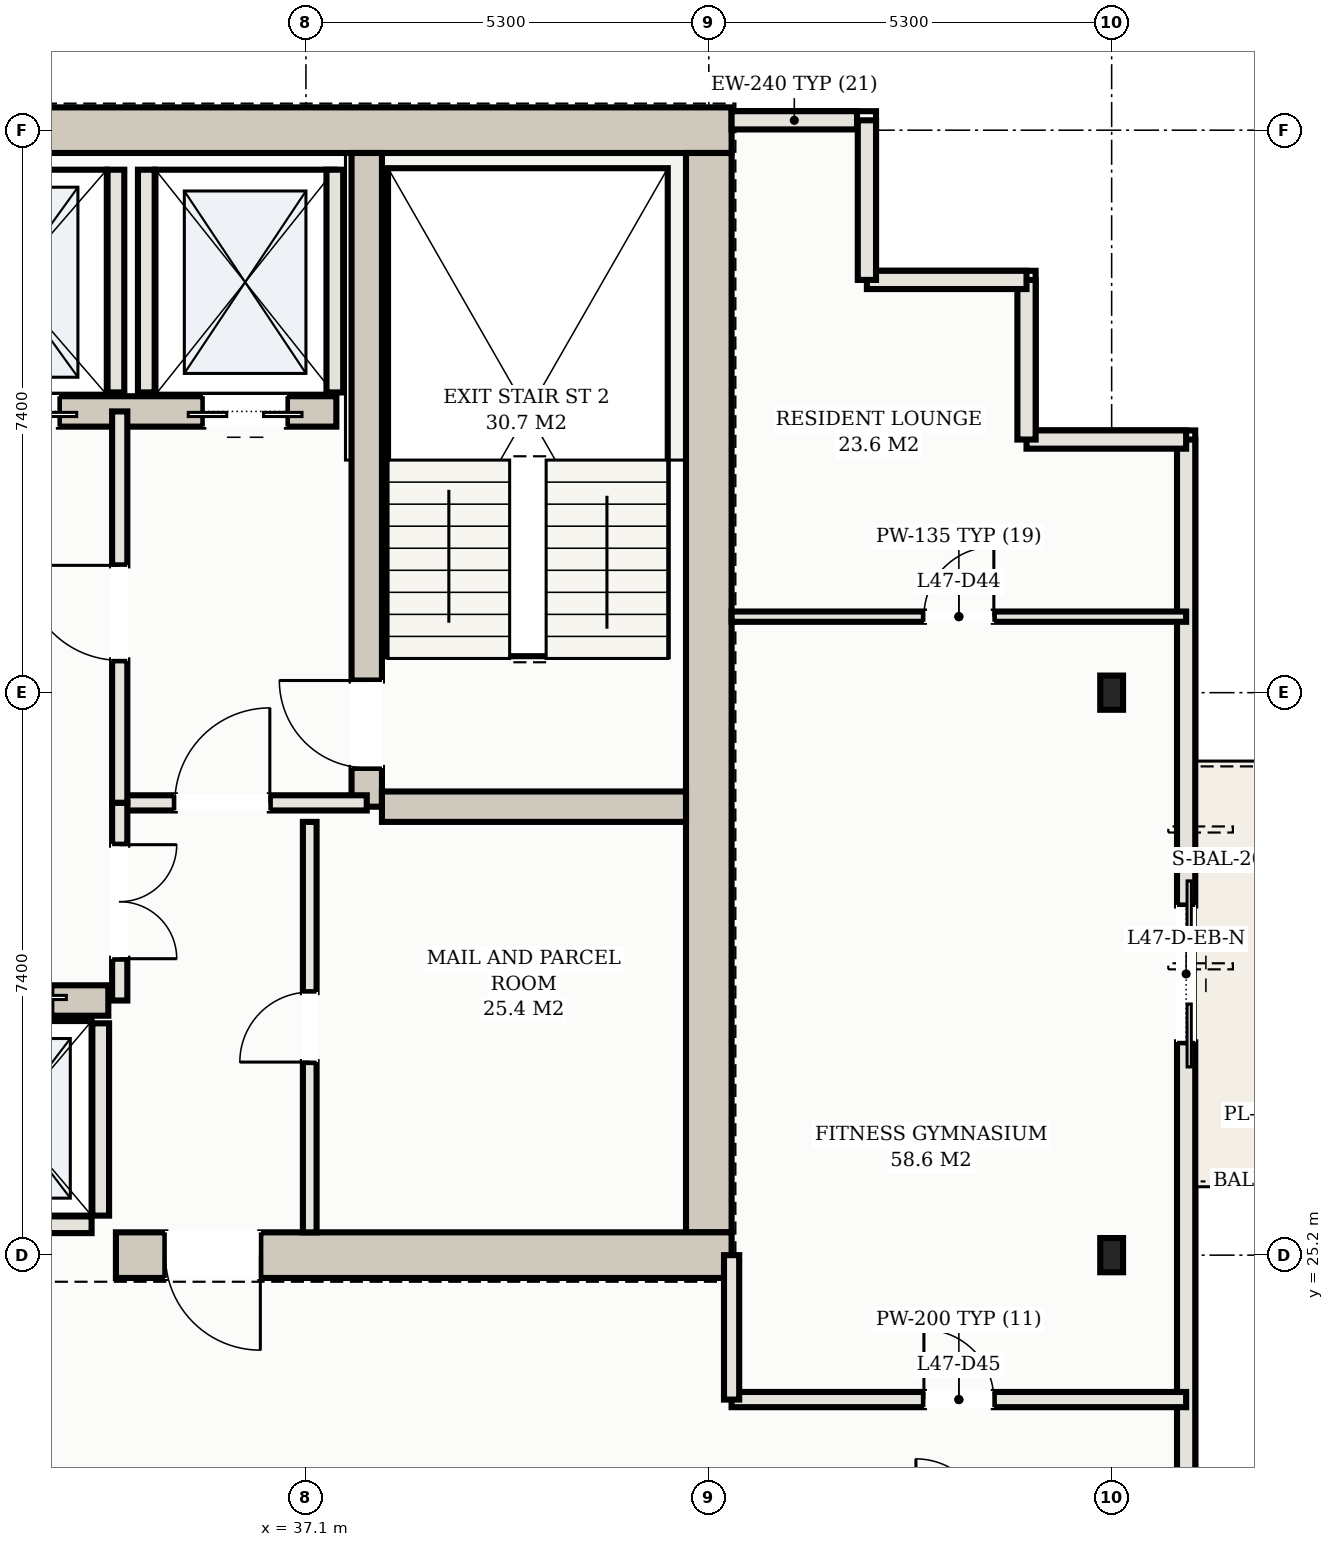
"""IFC4 building model, lengths in metres.
Left out: names, types, materials, properties, quantities, classifications, styles, units other than length and angle.
Written with IfcOpenShell. Run it as: python <this file> out.ifc"""

import sys

from ifc_helpers import new_model, si_unit, direction, frame, frame_2d, origin, origin_2d, place, context, subcontext, project, spatial, rectangle, hollow_rectangle, extrude, element, fill, save


model = new_model("IFC4")
c1 = context("Model", 3, precision=1e-05, world=origin(), true_north=direction((0.0, 1.0)))
c2 = subcontext(c1, "Body", "Model", "MODEL_VIEW")
j1 = project(units=[si_unit("LENGTHUNIT", "METRE"), si_unit("PLANEANGLEUNIT", "RADIAN")], contexts=[c1])
p1 = place(None, origin())
s1 = spatial("IfcSite", under=j1, at=p1, CompositionType="ELEMENT")
p2 = place(p1, origin())
s2 = spatial("IfcBuilding", under=s1, at=p2, CompositionType="ELEMENT")
p3 = place(p2, frame((0.0, 0.0, 172.2)))
s3 = spatial("IfcBuildingStorey", under=s2, at=p3, CompositionType="ELEMENT", Elevation=172.2)
p4 = place(p3, frame((10.3, 40.0, 0.0), z_axis=(0.0, 0.0, 1.0), x_axis=(1.0, 0.0, 0.0)))
e1 = element("IfcWall", 1, at=p4, inside=s3, PredefinedType="SHEAR", context=c2, shape_type="SweptSolid", body=[
    extrude(rectangle(XDim=32.4, YDim=0.6, at=frame_2d((16.2, 0.0))), origin(), (0.0, 0.0, 1.0), 3.1),
])
p5 = place(p3, frame((42.4, 25.5, 0.0), z_axis=(0.0, 0.0, 1.0), x_axis=(0.0, 1.0, 0.0)))
e2 = element("IfcWall", 2, at=p5, inside=s3, PredefinedType="SHEAR", context=c2, shape_type="SweptSolid", body=[
    extrude(rectangle(XDim=14.2, YDim=0.6, at=frame_2d((7.1, 0.0))), origin(), (0.0, 0.0, 1.0), 3.1),
])
p6 = place(p3, frame((34.6, 25.2, 0.0), z_axis=(0.0, 0.0, 1.0), x_axis=(1.0, 0.0, 0.0)))
e3 = element("IfcWall", 3, at=p6, inside=s3, PredefinedType="SHEAR", context=c2, shape_type="SweptSolid", body=[
    extrude(rectangle(XDim=8.1, YDim=0.6, at=frame_2d((4.05, 0.0))), origin(), (0.0, 0.0, 1.0), 3.1),
])
p7 = place(p6, frame((0.65, 0.0, 0.0)))
e4 = element("IfcOpeningElement", 4, at=p7, cuts=e3, PredefinedType="OPENING", context=c2, shape_type="SweptSolid", body=[
    extrude(rectangle(XDim=1.25, YDim=2.2, at=frame_2d((0.625, 1.1))), frame((0.0, 0.31, 0.0), z_axis=(0.0, -1.0, 0.0), x_axis=(1.0, 0.0, 0.0)), (0.0, 0.0, 1.0), 0.62),
])
p8 = place(p3, frame((37.9, 31.1, 0.0), z_axis=(0.0, 0.0, 1.0), x_axis=(0.0, 1.0, 0.0)))
e5 = element("IfcWall", 5, at=p8, inside=s3, PredefinedType="SHEAR", context=c2, shape_type="SweptSolid", body=[
    extrude(rectangle(XDim=8.6, YDim=0.4, at=frame_2d((4.3, 0.0))), origin(), (0.0, 0.0, 1.0), 3.1),
])
p9 = place(p8, frame((0.51, 0.0, 0.0)))
e6 = element("IfcOpeningElement", 6, at=p9, cuts=e5, PredefinedType="OPENING", context=c2, shape_type="SweptSolid", body=[
    extrude(rectangle(XDim=1.15, YDim=2.2, at=frame_2d((0.575, 1.1))), frame((0.0, 0.21, 0.0), z_axis=(0.0, -1.0, 0.0), x_axis=(1.0, 0.0, 0.0)), (0.0, 0.0, 1.0), 0.42),
])
p10 = place(p3, frame((38.1, 31.1, 0.0), z_axis=(0.0, 0.0, 1.0), x_axis=(1.0, 0.0, 0.0)))
e7 = element("IfcWall", 7, at=p10, inside=s3, PredefinedType="SHEAR", context=c2, shape_type="SweptSolid", body=[
    extrude(rectangle(XDim=4.0, YDim=0.4, at=frame_2d((2.0, 0.0))), origin(), (0.0, 0.0, 1.0), 3.1),
])
p11 = place(p3, frame((15.5, 36.3, 0.0), z_axis=(0.0, 0.0, 1.0), x_axis=(1.0, 0.0, 0.0)))
e8 = element("IfcWall", 8, at=p11, inside=s3, PredefinedType="SHEAR", context=c2, shape_type="SweptSolid", body=[
    extrude(rectangle(XDim=22.0, YDim=0.4, at=frame_2d((11.0, 0.0))), origin(), (0.0, 0.0, 1.0), 3.1),
])
p12 = place(p11, frame((0.65, 0.0, 0.0)))
e9 = element("IfcOpeningElement", 9, at=p12, cuts=e8, PredefinedType="OPENING", context=c2, shape_type="SweptSolid", body=[
    extrude(rectangle(XDim=1.1, YDim=2.15, at=frame_2d((0.55, 1.075))), frame((0.0, 0.21, 0.0), z_axis=(0.0, -1.0, 0.0), x_axis=(1.0, 0.0, 0.0)), (0.0, 0.0, 1.0), 0.42),
])
p13 = place(p11, frame((20.25, 0.0, 0.0)))
e10 = element("IfcOpeningElement", 10, at=p13, cuts=e8, PredefinedType="OPENING", context=c2, shape_type="SweptSolid", body=[
    extrude(rectangle(XDim=1.1, YDim=2.15, at=frame_2d((0.55, 1.075))), frame((0.0, 0.21, 0.0), z_axis=(0.0, -1.0, 0.0), x_axis=(1.0, 0.0, 0.0)), (0.0, 0.0, 1.0), 0.42),
])
p14 = place(p11, frame((17.05, 0.0, 0.0)))
e11 = element("IfcOpeningElement", 11, at=p14, cuts=e8, PredefinedType="OPENING", context=c2, shape_type="SweptSolid", body=[
    extrude(rectangle(XDim=1.3, YDim=2.2, at=frame_2d((0.65, 1.1))), frame((0.0, 0.21, 0.0), z_axis=(0.0, -1.0, 0.0), x_axis=(1.0, 0.0, 0.0)), (0.0, 0.0, 1.0), 0.42),
])
p15 = place(p3, frame((18.5, 28.55, 0.0), z_axis=(0.0, 0.0, 1.0), x_axis=(1.0, 0.0, 0.0)))
e12 = element("IfcWall", 12, at=p15, inside=s3, PredefinedType="SHEAR", context=c2, shape_type="SweptSolid", body=[
    extrude(rectangle(XDim=16.0, YDim=0.4, at=frame_2d((8.0, 0.0))), origin(), (0.0, 0.0, 1.0), 3.1),
])
p16 = place(p15, frame((8.95, 0.0, 0.0)))
e13 = element("IfcOpeningElement", 13, at=p16, cuts=e12, PredefinedType="OPENING", context=c2, shape_type="SweptSolid", body=[
    extrude(rectangle(XDim=1.1, YDim=2.15, at=frame_2d((0.55, 1.075))), frame((0.0, 0.21, 0.0), z_axis=(0.0, -1.0, 0.0), x_axis=(1.0, 0.0, 0.0)), (0.0, 0.0, 1.0), 0.42),
])
p17 = place(p15, frame((11.55, 0.0, 0.0)))
e14 = element("IfcOpeningElement", 14, at=p17, cuts=e12, PredefinedType="OPENING", context=c2, shape_type="SweptSolid", body=[
    extrude(rectangle(XDim=1.1, YDim=2.15, at=frame_2d((0.55, 1.075))), frame((0.0, 0.21, 0.0), z_axis=(0.0, -1.0, 0.0), x_axis=(1.0, 0.0, 0.0)), (0.0, 0.0, 1.0), 0.42),
])
p18 = place(p15, frame((14.15, 0.0, 0.0)))
e15 = element("IfcOpeningElement", 15, at=p18, cuts=e12, PredefinedType="OPENING", context=c2, shape_type="SweptSolid", body=[
    extrude(rectangle(XDim=1.1, YDim=2.15, at=frame_2d((0.55, 1.075))), frame((0.0, 0.21, 0.0), z_axis=(0.0, -1.0, 0.0), x_axis=(1.0, 0.0, 0.0)), (0.0, 0.0, 1.0), 0.42),
])
for number, where, z_axis, x_axis in (
    (16, (47.7, 25.2, 0.0), (0.0, 0.0, 1.0), (1.0, 0.0, 0.0)),
    (17, (47.7, 32.6, 0.0), (0.0, 0.0, 1.0), (1.0, 0.0, 0.0)),
):
    element("IfcColumn", number, at=place(p3, frame(where, z_axis=z_axis, x_axis=x_axis)), inside=s3, PredefinedType="COLUMN", context=c2, shape_type="SweptSolid", body=[
        extrude(hollow_rectangle(XDim=0.3, YDim=0.45, WallThickness=0.016, at=origin_2d()), origin(), (0.0, 0.0, 1.0), 3.3),
    ])
for number, where, z_axis, x_axis in (
    (18, (35.0, 36.55, 0.0), (0.0, 0.0, 1.0), (0.0, 1.0, 0.0)),
    (19, (37.48, 36.55, 0.0), (0.0, 0.0, 1.0), (0.0, 1.0, 0.0)),
    (20, (34.6, 36.55, 0.0), (0.0, 0.0, 1.0), (0.0, 1.0, 0.0)),
):
    element("IfcWall", number, at=place(p3, frame(where, z_axis=z_axis, x_axis=x_axis)), inside=s3, PredefinedType="SOLIDWALL", context=c2, shape_type="SweptSolid", body=[
        extrude(rectangle(XDim=2.93, YDim=0.22, at=frame_2d((1.465, 0.0))), origin(), (0.0, 0.0, 1.0), 3.1),
    ])
p19 = place(p3, frame((34.4, 25.72, 0.0), z_axis=(0.0, 0.0, 1.0), x_axis=(0.0, 1.0, 0.0)))
e21 = element("IfcWall", 21, at=p19, inside=s3, PredefinedType="SOLIDWALL", context=c2, shape_type="SweptSolid", body=[
    extrude(rectangle(XDim=2.53, YDim=0.22, at=frame_2d((1.265, 0.0))), origin(), (0.0, 0.0, 1.0), 3.1),
])
p20 = place(p3, frame((32.12, 25.6, 0.0), z_axis=(0.0, 0.0, 1.0), x_axis=(1.0, 0.0, 0.0)))
e22 = element("IfcWall", 22, at=p20, inside=s3, PredefinedType="SOLIDWALL", context=c2, shape_type="SweptSolid", body=[
    extrude(rectangle(XDim=2.16, YDim=0.22, at=frame_2d((1.08, 0.0))), origin(), (0.0, 0.0, 1.0), 2.295),
])
p21 = place(p3, frame((48.68, 8.52, 0.0), z_axis=(0.0, 0.0, 1.0), x_axis=(0.0, 1.0, 0.0)))
e23 = element("IfcWall", 23, at=p21, inside=s3, PredefinedType="SOLIDWALL", context=c2, shape_type="SweptSolid", body=[
    extrude(rectangle(XDim=27.41, YDim=0.24, at=frame_2d((13.705, 0.0))), origin(), (0.0, 0.0, 1.0), 3.1),
])
p22 = place(p21, frame((19.48, 0.0, 0.0)))
e24 = element("IfcOpeningElement", 24, at=p22, cuts=e23, PredefinedType="OPENING", context=c2, shape_type="SweptSolid", body=[
    extrude(rectangle(XDim=1.8, YDim=2.2, at=frame_2d((0.9, 1.1))), frame((0.0, 0.13, 0.0), z_axis=(0.0, -1.0, 0.0), x_axis=(1.0, 0.0, 0.0)), (0.0, 0.0, 1.0), 0.26),
])
p23 = place(p3, frame((48.68, 35.93, 0.0), z_axis=(0.0, 0.0, 1.0), x_axis=(-1.0, 0.0, 0.0)))
e25 = element("IfcWall", 25, at=p23, inside=s3, PredefinedType="SOLIDWALL", context=c2, shape_type="SweptSolid", body=[
    extrude(rectangle(XDim=2.1, YDim=0.24, at=frame_2d((1.05, 0.0))), origin(), (0.0, 0.0, 1.0), 3.1),
])
for number, where, z_axis, x_axis in (
    (26, (46.58, 35.93, 0.0), (0.0, 0.0, 1.0), (0.0, 1.0, 0.0)),
    (27, (46.58, 38.03, 0.0), (0.0, 0.0, 1.0), (-1.0, 0.0, 0.0)),
):
    element("IfcWall", number, at=place(p3, frame(where, z_axis=z_axis, x_axis=x_axis)), inside=s3, PredefinedType="SOLIDWALL", context=c2, shape_type="SweptSolid", body=[
        extrude(rectangle(XDim=2.1, YDim=0.24, at=frame_2d((1.05, 0.0))), origin(), (0.0, 0.0, 1.0), 3.1),
    ])
p24 = place(p3, frame((44.48, 38.03, 0.0), z_axis=(0.0, 0.0, 1.0), x_axis=(0.0, 1.0, 0.0)))
e28 = element("IfcWall", 28, at=p24, inside=s3, PredefinedType="SOLIDWALL", context=c2, shape_type="SweptSolid", body=[
    extrude(rectangle(XDim=2.1, YDim=0.24, at=frame_2d((1.05, 0.0))), origin(), (0.0, 0.0, 1.0), 3.1),
])
p25 = place(p3, frame((44.35, 40.13, 0.0), z_axis=(0.0, 0.0, 1.0), x_axis=(-1.0, 0.0, 0.0)))
e29 = element("IfcWall", 29, at=p25, inside=s3, PredefinedType="SOLIDWALL", context=c2, shape_type="SweptSolid", body=[
    extrude(rectangle(XDim=1.65, YDim=0.24, at=frame_2d((0.825, 0.0))), origin(), (0.0, 0.0, 1.0), 3.1),
])
p26 = place(p3, frame((34.65, 31.15, 0.0), z_axis=(0.0, 0.0, 1.0), x_axis=(1.0, 0.0, 0.0)))
e30 = element("IfcWall", 30, at=p26, inside=s3, PredefinedType="PARTITIONING", context=c2, shape_type="SweptSolid", body=[
    extrude(rectangle(XDim=3.25, YDim=0.2, at=frame_2d((1.625, 0.0))), origin(), (0.0, 0.0, 1.0), 2.38),
])
p27 = place(p26, frame((0.725, 0.0, 0.0)))
e31 = element("IfcOpeningElement", 31, at=p27, cuts=e30, PredefinedType="OPENING", context=c2, shape_type="SweptSolid", body=[
    extrude(rectangle(XDim=1.25, YDim=2.2, at=frame_2d((0.625, 1.1))), frame((0.0, 0.11, 0.0), z_axis=(0.0, -1.0, 0.0), x_axis=(1.0, 0.0, 0.0)), (0.0, 0.0, 1.0), 0.22),
])
p28 = place(p3, frame((34.65, 31.15, 0.0), z_axis=(0.0, 0.0, 1.0), x_axis=(0.0, 1.0, 0.0)))
e32 = element("IfcWall", 32, at=p28, inside=s3, PredefinedType="PARTITIONING", context=c2, shape_type="SweptSolid", body=[
    extrude(rectangle(XDim=5.15, YDim=0.2, at=frame_2d((2.575, 0.0))), origin(), (0.0, 0.0, 1.0), 2.38),
])
p29 = place(p28, frame((1.875, 0.0, 0.0)))
e33 = element("IfcOpeningElement", 33, at=p29, cuts=e32, PredefinedType="OPENING", context=c2, shape_type="SweptSolid", body=[
    extrude(rectangle(XDim=1.25, YDim=2.2, at=frame_2d((0.625, 1.1))), frame((0.0, 0.11, 0.0), z_axis=(0.0, -1.0, 0.0), x_axis=(1.0, 0.0, 0.0)), (0.0, 0.0, 1.0), 0.22),
])
p30 = place(p3, frame((37.15, 25.5, 0.0), z_axis=(0.0, 0.0, 1.0), x_axis=(0.0, 1.0, 0.0)))
e34 = element("IfcWall", 34, at=p30, inside=s3, PredefinedType="PARTITIONING", context=c2, shape_type="SweptSolid", body=[
    extrude(rectangle(XDim=5.4, YDim=0.18, at=frame_2d((2.7, 0.0))), origin(), (0.0, 0.0, 1.0), 2.38),
])
p31 = place(p30, frame((2.24, 0.0, 0.0)))
e35 = element("IfcOpeningElement", 35, at=p31, cuts=e34, PredefinedType="OPENING", context=c2, shape_type="SweptSolid", body=[
    extrude(rectangle(XDim=0.92, YDim=2.15, at=frame_2d((0.46, 1.075))), frame((0.0, 0.1, 0.0), z_axis=(0.0, -1.0, 0.0), x_axis=(1.0, 0.0, 0.0)), (0.0, 0.0, 1.0), 0.2),
])
p32 = place(p3, frame((34.65, 28.55, 0.0), z_axis=(0.0, 0.0, 1.0), x_axis=(0.0, 1.0, 0.0)))
e36 = element("IfcWall", 36, at=p32, inside=s3, PredefinedType="PARTITIONING", context=c2, shape_type="SweptSolid", body=[
    extrude(rectangle(XDim=2.6, YDim=0.2, at=frame_2d((1.3, 0.0))), origin(), (0.0, 0.0, 1.0), 2.38),
])
p33 = place(p32, frame((0.55, 0.0, 0.0)))
e37 = element("IfcOpeningElement", 37, at=p33, cuts=e36, PredefinedType="OPENING", context=c2, shape_type="SweptSolid", body=[
    extrude(rectangle(XDim=1.5, YDim=2.25, at=frame_2d((0.75, 1.125))), frame((0.0, 0.11, 0.0), z_axis=(0.0, -1.0, 0.0), x_axis=(1.0, 0.0, 0.0)), (0.0, 0.0, 1.0), 0.22),
])
p34 = place(p3, frame((42.7, 23.3, 0.0), z_axis=(0.0, 0.0, 1.0), x_axis=(1.0, 0.0, 0.0)))
e38 = element("IfcWall", 38, at=p34, inside=s3, PredefinedType="PARTITIONING", context=c2, shape_type="SweptSolid", body=[
    extrude(rectangle(XDim=5.98, YDim=0.2, at=frame_2d((2.99, 0.0))), origin(), (0.0, 0.0, 1.0), 2.38),
])
p35 = place(p34, frame((2.53, 0.0, 0.0)))
e39 = element("IfcOpeningElement", 39, at=p35, cuts=e38, PredefinedType="OPENING", context=c2, shape_type="SweptSolid", body=[
    extrude(rectangle(XDim=0.92, YDim=2.15, at=frame_2d((0.46, 1.075))), frame((0.0, 0.11, 0.0), z_axis=(0.0, -1.0, 0.0), x_axis=(1.0, 0.0, 0.0)), (0.0, 0.0, 1.0), 0.22),
])
p36 = place(p3, frame((42.7, 23.3, 0.0), z_axis=(0.0, 0.0, 1.0), x_axis=(0.0, 1.0, 0.0)))
e40 = element("IfcWall", 40, at=p36, inside=s3, PredefinedType="PARTITIONING", context=c2, shape_type="SweptSolid", body=[
    extrude(rectangle(XDim=1.9, YDim=0.2, at=frame_2d((0.95, 0.0))), origin(), (0.0, 0.0, 1.0), 2.38),
])
p37 = place(p3, frame((42.7, 33.6, 0.0), z_axis=(0.0, 0.0, 1.0), x_axis=(1.0, 0.0, 0.0)))
e41 = element("IfcWall", 41, at=p37, inside=s3, PredefinedType="PARTITIONING", context=c2, shape_type="SweptSolid", body=[
    extrude(rectangle(XDim=5.98, YDim=0.135, at=frame_2d((2.99, 0.0))), origin(), (0.0, 0.0, 1.0), 2.38),
])
p38 = place(p37, frame((2.53, 0.0, 0.0)))
e42 = element("IfcOpeningElement", 42, at=p38, cuts=e41, PredefinedType="OPENING", context=c2, shape_type="SweptSolid", body=[
    extrude(rectangle(XDim=0.92, YDim=2.15, at=frame_2d((0.46, 1.075))), frame((0.0, 0.078, 0.0), z_axis=(0.0, -1.0, 0.0), x_axis=(1.0, 0.0, 0.0)), (0.0, 0.0, 1.0), 0.155),
])
p39 = place(p13, frame((1.1, 0.0, 0.0), z_axis=(0.0, 0.0, 1.0), x_axis=(-1.0, 0.0, 0.0)))
e43 = element("IfcDoor", 43, at=p39, inside=s3, OperationType="DOUBLE_DOOR_SLIDING", PredefinedType="DOOR", context=c2, shape_type="SweptSolid", body=[
    extrude(rectangle(XDim=1.1, YDim=2.15, at=frame_2d((0.55, 1.075))), frame((0.0, 0.025, 0.0), z_axis=(0.0, -1.0, 0.0), x_axis=(1.0, 0.0, 0.0)), (0.0, 0.0, 1.0), 0.05),
])
fill(e10, e43)
p40 = place(p14, frame((1.3, 0.0, 0.0), z_axis=(0.0, 0.0, 1.0), x_axis=(-1.0, 0.0, 0.0)))
e44 = element("IfcDoor", 44, at=p40, inside=s3, OperationType="DOUBLE_DOOR_SLIDING", PredefinedType="DOOR", context=c2, shape_type="SweptSolid", body=[
    extrude(rectangle(XDim=1.3, YDim=2.2, at=frame_2d((0.65, 1.1))), frame((0.0, 0.025, 0.0), z_axis=(0.0, -1.0, 0.0), x_axis=(1.0, 0.0, 0.0)), (0.0, 0.0, 1.0), 0.05),
])
fill(e11, e44)
p41 = place(p22, frame((1.8, 0.0, 0.0), z_axis=(0.0, 0.0, 1.0), x_axis=(-1.0, 0.0, 0.0)))
e45 = element("IfcDoor", 45, at=p41, inside=s3, OperationType="DOUBLE_DOOR_SLIDING", PredefinedType="DOOR", context=c2, shape_type="SweptSolid", body=[
    extrude(rectangle(XDim=1.8, YDim=2.2, at=frame_2d((0.9, 1.1))), frame((0.0, 0.025, 0.0), z_axis=(0.0, -1.0, 0.0), x_axis=(1.0, 0.0, 0.0)), (0.0, 0.0, 1.0), 0.05),
])
fill(e24, e45)
p42 = place(p7, frame((1.25, 0.0, 0.0), z_axis=(0.0, 0.0, 1.0), x_axis=(-1.0, 0.0, 0.0)))
e46 = element("IfcDoor", 46, at=p42, inside=s3, OperationType="SINGLE_SWING_LEFT", PredefinedType="DOOR", context=c2, shape_type="SweptSolid", body=[
    extrude(rectangle(XDim=1.25, YDim=2.2, at=frame_2d((0.625, 1.1))), frame((0.0, 0.025, 0.0), z_axis=(0.0, -1.0, 0.0), x_axis=(1.0, 0.0, 0.0)), (0.0, 0.0, 1.0), 0.05),
])
fill(e4, e46)
p43 = place(p27, origin())
e47 = element("IfcDoor", 47, at=p43, inside=s3, OperationType="SINGLE_SWING_RIGHT", PredefinedType="DOOR", context=c2, shape_type="SweptSolid", body=[
    extrude(rectangle(XDim=1.25, YDim=2.2, at=frame_2d((0.625, 1.1))), frame((0.0, 0.025, 0.0), z_axis=(0.0, -1.0, 0.0), x_axis=(1.0, 0.0, 0.0)), (0.0, 0.0, 1.0), 0.05),
])
fill(e31, e47)
p44 = place(p29, origin())
e48 = element("IfcDoor", 48, at=p44, inside=s3, OperationType="SINGLE_SWING_RIGHT", PredefinedType="DOOR", context=c2, shape_type="SweptSolid", body=[
    extrude(rectangle(XDim=1.25, YDim=2.2, at=frame_2d((0.625, 1.1))), frame((0.0, 0.025, 0.0), z_axis=(0.0, -1.0, 0.0), x_axis=(1.0, 0.0, 0.0)), (0.0, 0.0, 1.0), 0.05),
])
fill(e33, e48)
p45 = place(p9, origin())
e49 = element("IfcDoor", 49, at=p45, inside=s3, OperationType="SINGLE_SWING_RIGHT", PredefinedType="DOOR", context=c2, shape_type="SweptSolid", body=[
    extrude(rectangle(XDim=1.15, YDim=2.2, at=frame_2d((0.575, 1.1))), frame((0.0, 0.025, 0.0), z_axis=(0.0, -1.0, 0.0), x_axis=(1.0, 0.0, 0.0)), (0.0, 0.0, 1.0), 0.05),
])
fill(e6, e49)
p46 = place(p31, origin())
e50 = element("IfcDoor", 50, at=p46, inside=s3, OperationType="SINGLE_SWING_LEFT", PredefinedType="DOOR", context=c2, shape_type="SweptSolid", body=[
    extrude(rectangle(XDim=0.92, YDim=2.15, at=frame_2d((0.46, 1.075))), frame((0.0, 0.025, 0.0), z_axis=(0.0, -1.0, 0.0), x_axis=(1.0, 0.0, 0.0)), (0.0, 0.0, 1.0), 0.05),
])
fill(e35, e50)
p47 = place(p33, frame((1.5, 0.0, 0.0), z_axis=(0.0, 0.0, 1.0), x_axis=(-1.0, 0.0, 0.0)))
e51 = element("IfcDoor", 51, at=p47, inside=s3, OperationType="DOUBLE_DOOR_SINGLE_SWING", PredefinedType="DOOR", context=c2, shape_type="SweptSolid", body=[
    extrude(rectangle(XDim=1.5, YDim=2.25, at=frame_2d((0.75, 1.125))), frame((0.0, 0.025, 0.0), z_axis=(0.0, -1.0, 0.0), x_axis=(1.0, 0.0, 0.0)), (0.0, 0.0, 1.0), 0.05),
])
fill(e37, e51)
p48 = place(p38, origin())
e52 = element("IfcDoor", 52, at=p48, inside=s3, OperationType="SINGLE_SWING_RIGHT", PredefinedType="DOOR", context=c2, shape_type="SweptSolid", body=[
    extrude(rectangle(XDim=0.92, YDim=2.15, at=frame_2d((0.46, 1.075))), frame((0.0, 0.025, 0.0), z_axis=(0.0, -1.0, 0.0), x_axis=(1.0, 0.0, 0.0)), (0.0, 0.0, 1.0), 0.05),
])
fill(e42, e52)
p49 = place(p35, origin())
e53 = element("IfcDoor", 53, at=p49, inside=s3, OperationType="SINGLE_SWING_LEFT", PredefinedType="DOOR", context=c2, shape_type="SweptSolid", body=[
    extrude(rectangle(XDim=0.92, YDim=2.15, at=frame_2d((0.46, 1.075))), frame((0.0, 0.025, 0.0), z_axis=(0.0, -1.0, 0.0), x_axis=(1.0, 0.0, 0.0)), (0.0, 0.0, 1.0), 0.05),
])
fill(e39, e53)
save(model, sys.argv[1])
